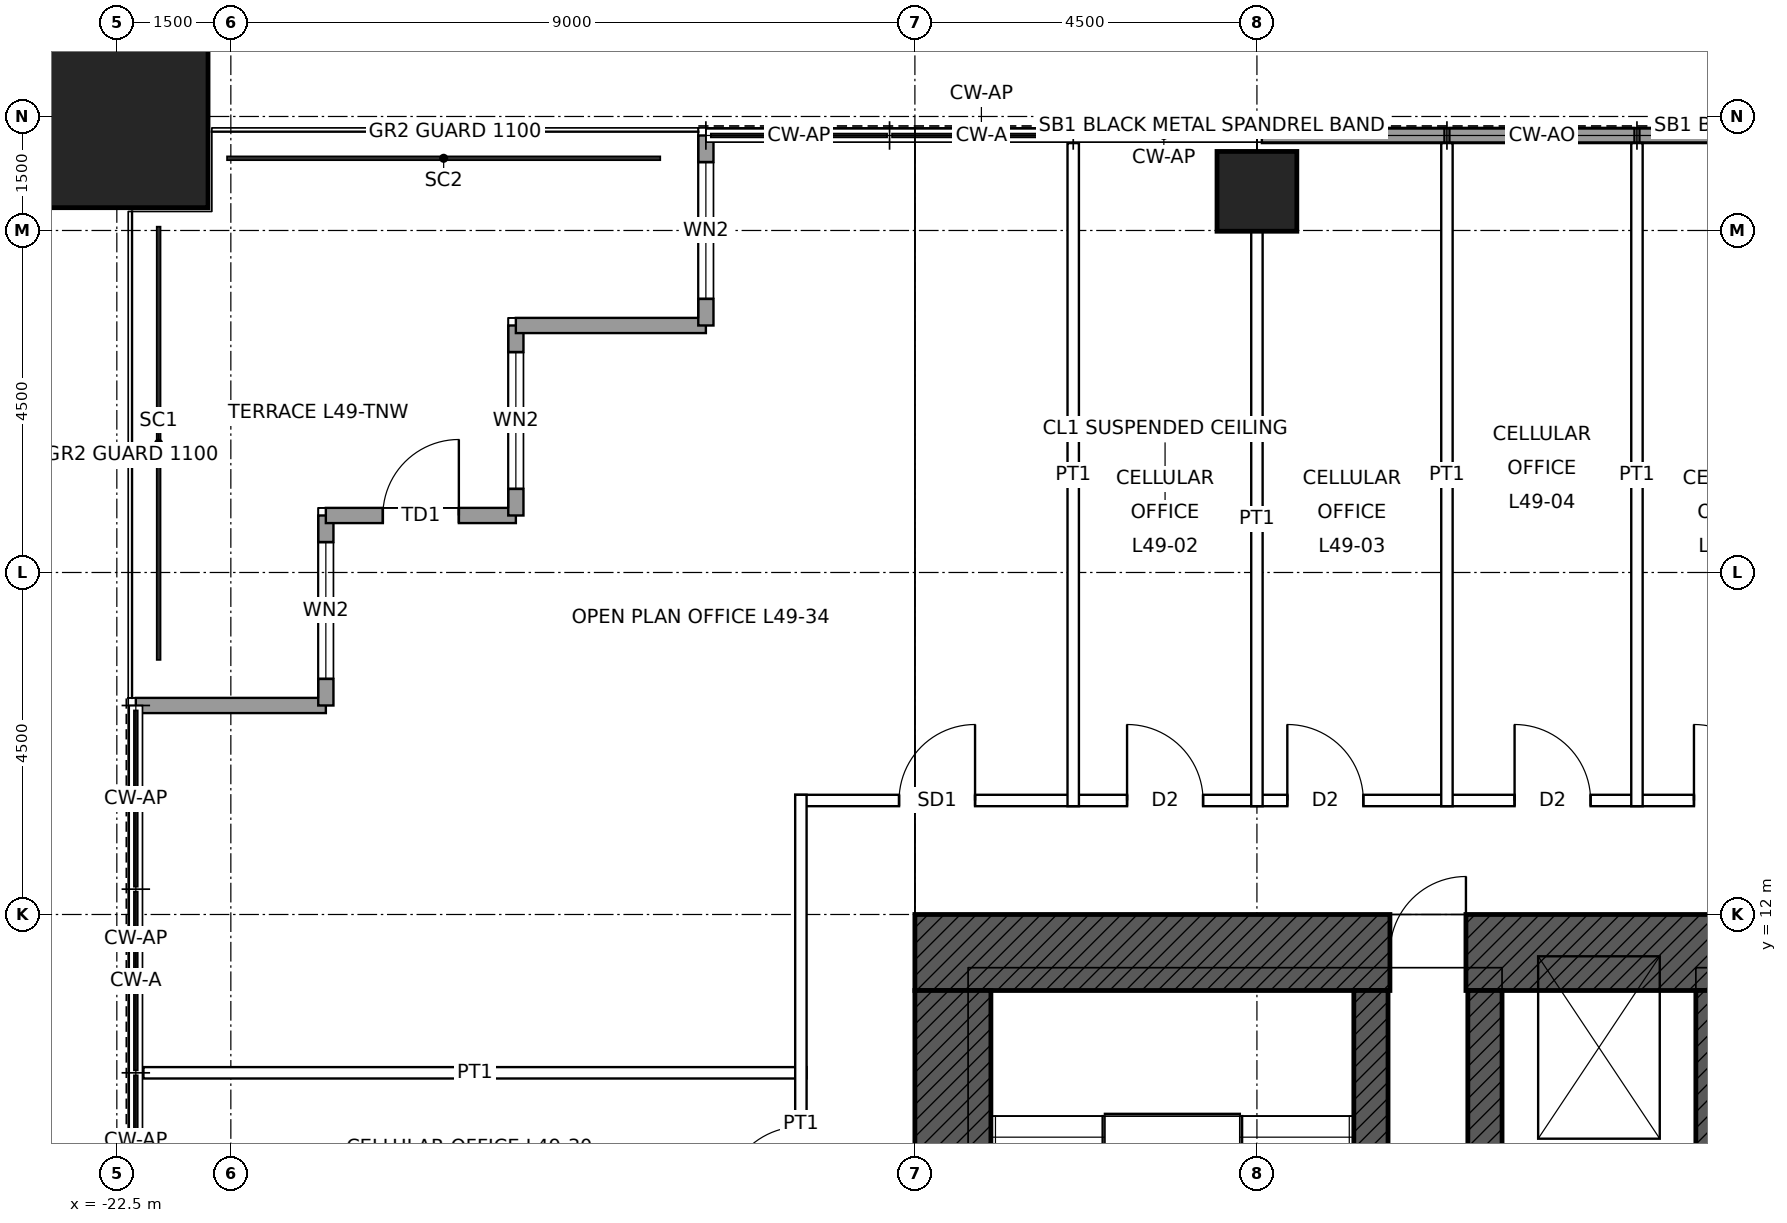
"""IFC4 building model, lengths in metres.
Left out: names, types, materials, properties, quantities, classifications, styles, units other than length and angle.
Written with IfcOpenShell. Run it as: python <this file> out.ifc"""

import sys

from ifc_helpers import new_model, si_unit, direction, frame, frame_2d, origin, origin_2d, place, context, subcontext, project, spatial, rectangle, hollow_rectangle, extrude, element, fill, save


model = new_model("IFC4")
c1 = context("Model", 3, precision=1e-05, world=origin(), true_north=direction((0.0, 1.0)))
c2 = subcontext(c1, "Body", "Model", "MODEL_VIEW")
j1 = project(units=[si_unit("LENGTHUNIT", "METRE"), si_unit("PLANEANGLEUNIT", "RADIAN")], contexts=[c1])
p1 = place(None, origin())
s1 = spatial("IfcSite", under=j1, at=p1, CompositionType="ELEMENT")
p2 = place(p1, origin())
s2 = spatial("IfcBuilding", under=s1, at=p2, CompositionType="ELEMENT")
p3 = place(p2, frame((0.0, 0.0, 229.9)))
s3 = spatial("IfcBuildingStorey", under=s2, at=p3, CompositionType="ELEMENT", Elevation=229.9)
p4 = place(p3, frame((-22.5, 22.5, 0.0), z_axis=(0.0, 0.0, 1.0), x_axis=(1.0, 0.0, 0.0)))
e1 = element("IfcColumn", 1, at=p4, inside=s3, PredefinedType="COLUMN", context=c2, shape_type="SweptSolid", body=[
    extrude(hollow_rectangle(XDim=2.4, YDim=2.4, WallThickness=0.12, at=origin_2d()), origin(), (0.0, 0.0, 1.0), 4.0),
])
p5 = place(p3, frame((-7.5, 21.515, 0.0), z_axis=(0.0, 0.0, 1.0), x_axis=(1.0, 0.0, 0.0)))
e2 = element("IfcColumn", 2, at=p5, inside=s3, PredefinedType="COLUMN", context=c2, shape_type="SweptSolid", body=[
    extrude(hollow_rectangle(XDim=1.05, YDim=1.05, WallThickness=0.07, at=origin_2d()), origin(), (0.0, 0.0, 1.0), 4.0),
])
p6 = place(p3, frame((-12.0, 11.5, 0.0), z_axis=(0.0, 0.0, 1.0), x_axis=(1.0, 0.0, 0.0)))
e3 = element("IfcWall", 3, at=p6, inside=s3, PredefinedType="SHEAR", context=c2, shape_type="SweptSolid", body=[
    extrude(rectangle(XDim=24.0, YDim=1.0, at=frame_2d((12.0, 0.0))), origin(), (0.0, 0.0, 1.0), 4.0),
])
p7 = place(p6, frame((6.25, 0.0, 0.0)))
e4 = element("IfcOpeningElement", 4, at=p7, cuts=e3, PredefinedType="OPENING", context=c2, shape_type="SweptSolid", body=[
    extrude(rectangle(XDim=1.0, YDim=2.4, at=frame_2d((0.5, 1.2))), frame((0.0, 0.51, 0.0), z_axis=(0.0, -1.0, 0.0), x_axis=(1.0, 0.0, 0.0)), (0.0, 0.0, 1.0), 1.02),
])
p8 = place(p6, frame((16.75, 0.0, 0.0)))
e5 = element("IfcOpeningElement", 5, at=p8, cuts=e3, PredefinedType="OPENING", context=c2, shape_type="SweptSolid", body=[
    extrude(rectangle(XDim=1.0, YDim=2.4, at=frame_2d((0.5, 1.2))), frame((0.0, 0.51, 0.0), z_axis=(0.0, -1.0, 0.0), x_axis=(1.0, 0.0, 0.0)), (0.0, 0.0, 1.0), 1.02),
])
p9 = place(p3, frame((-11.5, -11.0, 0.0), z_axis=(0.0, 0.0, 1.0), x_axis=(0.0, 1.0, 0.0)))
e6 = element("IfcWall", 6, at=p9, inside=s3, PredefinedType="SHEAR", context=c2, shape_type="SweptSolid", body=[
    extrude(rectangle(XDim=22.0, YDim=1.0, at=frame_2d((11.0, 0.0))), origin(), (0.0, 0.0, 1.0), 4.0),
])
p10 = place(p9, frame((10.5, 0.0, 0.0)))
e7 = element("IfcOpeningElement", 7, at=p10, cuts=e6, PredefinedType="OPENING", context=c2, shape_type="SweptSolid", body=[
    extrude(rectangle(XDim=1.0, YDim=2.4, at=frame_2d((0.5, 1.2))), frame((0.0, 0.51, 0.0), z_axis=(0.0, -1.0, 0.0), x_axis=(1.0, 0.0, 0.0)), (0.0, 0.0, 1.0), 1.02),
])
p11 = place(p3, frame((-6.0, 4.5, 0.0), z_axis=(0.0, 0.0, 1.0), x_axis=(0.0, 1.0, 0.0)))
e8 = element("IfcWall", 8, at=p11, inside=s3, PredefinedType="SHEAR", context=c2, shape_type="SweptSolid", body=[
    extrude(rectangle(XDim=6.5, YDim=0.45, at=frame_2d((3.25, 0.0))), origin(), (0.0, 0.0, 1.0), 4.0),
])
p12 = place(p11, frame((0.6, 0.0, 0.0)))
e9 = element("IfcOpeningElement", 9, at=p12, cuts=e8, PredefinedType="OPENING", context=c2, shape_type="SweptSolid", body=[
    extrude(rectangle(XDim=1.0, YDim=2.1, at=frame_2d((0.5, 1.05))), frame((0.0, 0.235, 0.0), z_axis=(0.0, -1.0, 0.0), x_axis=(1.0, 0.0, 0.0)), (0.0, 0.0, 1.0), 0.47),
])
for number, where, z_axis, x_axis in (
    (10, (-4.5, 8.5, 0.0), (0.0, 0.0, 1.0), (0.0, 1.0, 0.0)),
    (11, (-1.5, 8.5, 0.0), (0.0, 0.0, 1.0), (0.0, 1.0, 0.0)),
):
    element("IfcWall", number, at=place(p3, frame(where, z_axis=z_axis, x_axis=x_axis)), inside=s3, PredefinedType="SHEAR", context=c2, shape_type="SweptSolid", body=[
        extrude(rectangle(XDim=2.5, YDim=0.45, at=frame_2d((1.25, 0.0))), origin(), (0.0, 0.0, 1.0), 4.0),
    ])
p13 = place(p3, frame((-22.25, 14.75, 0.0), z_axis=(0.0, 0.0, 1.0), x_axis=(1.0, 0.0, 0.0)))
e12 = element("IfcWall", 12, at=p13, inside=s3, PredefinedType="SOLIDWALL", context=c2, shape_type="SweptSolid", body=[
    extrude(rectangle(XDim=2.5, YDim=0.2, at=frame_2d((1.25, 0.0))), origin(), (0.0, 0.0, 1.0), 3.85),
])
p14 = place(p3, frame((-19.75, 14.75, 0.0), z_axis=(0.0, 0.0, 1.0), x_axis=(0.0, 1.0, 0.0)))
e13 = element("IfcWall", 13, at=p14, inside=s3, PredefinedType="SOLIDWALL", context=c2, shape_type="SweptSolid", body=[
    extrude(rectangle(XDim=2.5, YDim=0.2, at=frame_2d((1.25, 0.0))), origin(), (0.0, 0.0, 1.0), 3.85),
])
p15 = place(p14, frame((0.35, 0.0, 0.3)))
e14 = element("IfcOpeningElement", 14, at=p15, cuts=e13, PredefinedType="OPENING", context=c2, shape_type="SweptSolid", body=[
    extrude(rectangle(XDim=1.8, YDim=2.4, at=frame_2d((0.9, 1.2))), frame((0.0, 0.11, 0.0), z_axis=(0.0, -1.0, 0.0), x_axis=(1.0, 0.0, 0.0)), (0.0, 0.0, 1.0), 0.22),
])
p16 = place(p3, frame((-19.75, 17.25, 0.0), z_axis=(0.0, 0.0, 1.0), x_axis=(1.0, 0.0, 0.0)))
e15 = element("IfcWall", 15, at=p16, inside=s3, PredefinedType="SOLIDWALL", context=c2, shape_type="SweptSolid", body=[
    extrude(rectangle(XDim=2.5, YDim=0.2, at=frame_2d((1.25, 0.0))), origin(), (0.0, 0.0, 1.0), 3.85),
])
p17 = place(p16, frame((0.75, 0.0, 0.0)))
e16 = element("IfcOpeningElement", 16, at=p17, cuts=e15, PredefinedType="OPENING", context=c2, shape_type="SweptSolid", body=[
    extrude(rectangle(XDim=1.0, YDim=2.4, at=frame_2d((0.5, 1.2))), frame((0.0, 0.11, 0.0), z_axis=(0.0, -1.0, 0.0), x_axis=(1.0, 0.0, 0.0)), (0.0, 0.0, 1.0), 0.22),
])
p18 = place(p3, frame((-17.25, 17.25, 0.0), z_axis=(0.0, 0.0, 1.0), x_axis=(0.0, 1.0, 0.0)))
e17 = element("IfcWall", 17, at=p18, inside=s3, PredefinedType="SOLIDWALL", context=c2, shape_type="SweptSolid", body=[
    extrude(rectangle(XDim=2.5, YDim=0.2, at=frame_2d((1.25, 0.0))), origin(), (0.0, 0.0, 1.0), 3.85),
])
p19 = place(p18, frame((0.35, 0.0, 0.3)))
e18 = element("IfcOpeningElement", 18, at=p19, cuts=e17, PredefinedType="OPENING", context=c2, shape_type="SweptSolid", body=[
    extrude(rectangle(XDim=1.8, YDim=2.4, at=frame_2d((0.9, 1.2))), frame((0.0, 0.11, 0.0), z_axis=(0.0, -1.0, 0.0), x_axis=(1.0, 0.0, 0.0)), (0.0, 0.0, 1.0), 0.22),
])
p20 = place(p3, frame((-17.25, 19.75, 0.0), z_axis=(0.0, 0.0, 1.0), x_axis=(1.0, 0.0, 0.0)))
e19 = element("IfcWall", 19, at=p20, inside=s3, PredefinedType="SOLIDWALL", context=c2, shape_type="SweptSolid", body=[
    extrude(rectangle(XDim=2.5, YDim=0.2, at=frame_2d((1.25, 0.0))), origin(), (0.0, 0.0, 1.0), 3.85),
])
p21 = place(p3, frame((-14.75, 19.75, 0.0), z_axis=(0.0, 0.0, 1.0), x_axis=(0.0, 1.0, 0.0)))
e20 = element("IfcWall", 20, at=p21, inside=s3, PredefinedType="SOLIDWALL", context=c2, shape_type="SweptSolid", body=[
    extrude(rectangle(XDim=2.5, YDim=0.2, at=frame_2d((1.25, 0.0))), origin(), (0.0, 0.0, 1.0), 3.85),
])
p22 = place(p21, frame((0.35, 0.0, 0.3)))
e21 = element("IfcOpeningElement", 21, at=p22, cuts=e20, PredefinedType="OPENING", context=c2, shape_type="SweptSolid", body=[
    extrude(rectangle(XDim=1.8, YDim=2.4, at=frame_2d((0.9, 1.2))), frame((0.0, 0.11, 0.0), z_axis=(0.0, -1.0, 0.0), x_axis=(1.0, 0.0, 0.0)), (0.0, 0.0, 1.0), 0.22),
])
p23 = place(p3, frame((-7.435, 22.25, 0.0), z_axis=(0.0, 0.0, 1.0), x_axis=(1.0, 0.0, 0.0)))
e22 = element("IfcWall", 22, at=p23, inside=s3, PredefinedType="SOLIDWALL", context=c2, shape_type="SweptSolid", body=[
    extrude(rectangle(XDim=2.403, YDim=0.2, at=frame_2d((1.201, 0.0))), origin(), (0.0, 0.0, 1.0), 3.85),
])
p24 = place(p3, frame((-4.968, 22.25, 0.0), z_axis=(0.0, 0.0, 1.0), x_axis=(1.0, 0.0, 0.0)))
e23 = element("IfcWall", 23, at=p24, inside=s3, PredefinedType="SOLIDWALL", context=c2, shape_type="SweptSolid", body=[
    extrude(rectangle(XDim=2.435, YDim=0.2, at=frame_2d((1.218, 0.0))), origin(), (0.0, 0.0, 1.0), 3.85),
])
p25 = place(p3, frame((-2.468, 22.25, 0.0), z_axis=(0.0, 0.0, 1.0), x_axis=(1.0, 0.0, 0.0)))
e24 = element("IfcWall", 24, at=p25, inside=s3, PredefinedType="SOLIDWALL", context=c2, shape_type="SweptSolid", body=[
    extrude(rectangle(XDim=2.403, YDim=0.2, at=frame_2d((1.201, 0.0))), origin(), (0.0, 0.0, 1.0), 3.85),
])
p26 = place(p3, frame((-22.15, 9.917, 0.0), z_axis=(0.0, 0.0, 1.0), x_axis=(1.0, 0.0, 0.0)))
e25 = element("IfcWall", 25, at=p26, inside=s3, PredefinedType="PARTITIONING", context=c2, shape_type="SweptSolid", body=[
    extrude(rectangle(XDim=8.725, YDim=0.15, at=frame_2d((4.362, 0.0))), origin(), (0.0, 0.0, 1.0), 3.85),
])
p27 = place(p3, frame((-13.575, 13.5, 0.0), z_axis=(0.0, 0.0, 1.0), x_axis=(1.0, 0.0, 0.0)))
e26 = element("IfcWall", 26, at=p27, inside=s3, PredefinedType="PARTITIONING", context=c2, shape_type="SweptSolid", body=[
    extrude(rectangle(XDim=27.15, YDim=0.15, at=frame_2d((13.575, 0.0))), origin(), (0.0, 0.0, 1.0), 3.85),
])
p28 = place(p27, frame((4.366, 0.0, 0.0)))
e27 = element("IfcOpeningElement", 27, at=p28, cuts=e26, PredefinedType="OPENING", context=c2, shape_type="SweptSolid", body=[
    extrude(rectangle(XDim=1.0, YDim=2.1, at=frame_2d((0.5, 1.05))), frame((0.0, 0.085, 0.0), z_axis=(0.0, -1.0, 0.0), x_axis=(1.0, 0.0, 0.0)), (0.0, 0.0, 1.0), 0.17),
])
p29 = place(p27, frame((6.475, 0.0, 0.0)))
e28 = element("IfcOpeningElement", 28, at=p29, cuts=e26, PredefinedType="OPENING", context=c2, shape_type="SweptSolid", body=[
    extrude(rectangle(XDim=1.0, YDim=2.1, at=frame_2d((0.5, 1.05))), frame((0.0, 0.085, 0.0), z_axis=(0.0, -1.0, 0.0), x_axis=(1.0, 0.0, 0.0)), (0.0, 0.0, 1.0), 0.17),
])
p30 = place(p27, frame((9.465, 0.0, 0.0)))
e29 = element("IfcOpeningElement", 29, at=p30, cuts=e26, PredefinedType="OPENING", context=c2, shape_type="SweptSolid", body=[
    extrude(rectangle(XDim=1.0, YDim=2.1, at=frame_2d((0.5, 1.05))), frame((0.0, 0.085, 0.0), z_axis=(0.0, -1.0, 0.0), x_axis=(1.0, 0.0, 0.0)), (0.0, 0.0, 1.0), 0.17),
])
p31 = place(p27, frame((11.825, 0.0, 0.0)))
e30 = element("IfcOpeningElement", 30, at=p31, cuts=e26, PredefinedType="OPENING", context=c2, shape_type="SweptSolid", body=[
    extrude(rectangle(XDim=1.0, YDim=2.1, at=frame_2d((0.5, 1.05))), frame((0.0, 0.085, 0.0), z_axis=(0.0, -1.0, 0.0), x_axis=(1.0, 0.0, 0.0)), (0.0, 0.0, 1.0), 0.17),
])
p32 = place(p27, frame((14.325, 0.0, 0.0)))
e31 = element("IfcOpeningElement", 31, at=p32, cuts=e26, PredefinedType="OPENING", context=c2, shape_type="SweptSolid", body=[
    extrude(rectangle(XDim=1.0, YDim=2.1, at=frame_2d((0.5, 1.05))), frame((0.0, 0.085, 0.0), z_axis=(0.0, -1.0, 0.0), x_axis=(1.0, 0.0, 0.0)), (0.0, 0.0, 1.0), 0.17),
])
p33 = place(p27, frame((16.475, 0.0, 0.0)))
e32 = element("IfcOpeningElement", 32, at=p33, cuts=e26, PredefinedType="OPENING", context=c2, shape_type="SweptSolid", body=[
    extrude(rectangle(XDim=1.0, YDim=2.1, at=frame_2d((0.5, 1.05))), frame((0.0, 0.085, 0.0), z_axis=(0.0, -1.0, 0.0), x_axis=(1.0, 0.0, 0.0)), (0.0, 0.0, 1.0), 0.17),
])
p34 = place(p27, frame((19.675, 0.0, 0.0)))
e33 = element("IfcOpeningElement", 33, at=p34, cuts=e26, PredefinedType="OPENING", context=c2, shape_type="SweptSolid", body=[
    extrude(rectangle(XDim=1.0, YDim=2.1, at=frame_2d((0.5, 1.05))), frame((0.0, 0.085, 0.0), z_axis=(0.0, -1.0, 0.0), x_axis=(1.0, 0.0, 0.0)), (0.0, 0.0, 1.0), 0.17),
])
p35 = place(p27, frame((21.783, 0.0, 0.0)))
e34 = element("IfcOpeningElement", 34, at=p35, cuts=e26, PredefinedType="OPENING", context=c2, shape_type="SweptSolid", body=[
    extrude(rectangle(XDim=1.0, YDim=2.1, at=frame_2d((0.5, 1.05))), frame((0.0, 0.085, 0.0), z_axis=(0.0, -1.0, 0.0), x_axis=(1.0, 0.0, 0.0)), (0.0, 0.0, 1.0), 0.17),
])
p36 = place(p27, frame((24.783, 0.0, 0.0)))
e35 = element("IfcOpeningElement", 35, at=p36, cuts=e26, PredefinedType="OPENING", context=c2, shape_type="SweptSolid", body=[
    extrude(rectangle(XDim=1.0, YDim=2.4, at=frame_2d((0.5, 1.2))), frame((0.0, 0.085, 0.0), z_axis=(0.0, -1.0, 0.0), x_axis=(1.0, 0.0, 0.0)), (0.0, 0.0, 1.0), 0.17),
])
p37 = place(p27, frame((1.366, 0.0, 0.0)))
e36 = element("IfcOpeningElement", 36, at=p37, cuts=e26, PredefinedType="OPENING", context=c2, shape_type="SweptSolid", body=[
    extrude(rectangle(XDim=1.0, YDim=2.4, at=frame_2d((0.5, 1.2))), frame((0.0, 0.085, 0.0), z_axis=(0.0, -1.0, 0.0), x_axis=(1.0, 0.0, 0.0)), (0.0, 0.0, 1.0), 0.17),
])
p38 = place(p3, frame((-13.5, 4.925, 0.0), z_axis=(0.0, 0.0, 1.0), x_axis=(0.0, 1.0, 0.0)))
e37 = element("IfcWall", 37, at=p38, inside=s3, PredefinedType="PARTITIONING", context=c2, shape_type="SweptSolid", body=[
    extrude(rectangle(XDim=8.65, YDim=0.15, at=frame_2d((4.325, 0.0))), origin(), (0.0, 0.0, 1.0), 3.85),
])
p39 = place(p38, frame((0.825, 0.0, 0.0)))
e38 = element("IfcOpeningElement", 38, at=p39, cuts=e37, PredefinedType="OPENING", context=c2, shape_type="SweptSolid", body=[
    extrude(rectangle(XDim=1.0, YDim=2.1, at=frame_2d((0.5, 1.05))), frame((0.0, 0.085, 0.0), z_axis=(0.0, -1.0, 0.0), x_axis=(1.0, 0.0, 0.0)), (0.0, 0.0, 1.0), 0.17),
])
p40 = place(p38, frame((3.283, 0.0, 0.0)))
e39 = element("IfcOpeningElement", 39, at=p40, cuts=e37, PredefinedType="OPENING", context=c2, shape_type="SweptSolid", body=[
    extrude(rectangle(XDim=1.0, YDim=2.1, at=frame_2d((0.5, 1.05))), frame((0.0, 0.085, 0.0), z_axis=(0.0, -1.0, 0.0), x_axis=(1.0, 0.0, 0.0)), (0.0, 0.0, 1.0), 0.17),
])
p41 = place(p3, frame((-9.917, 13.425, 0.0), z_axis=(0.0, 0.0, 1.0), x_axis=(0.0, 1.0, 0.0)))
e40 = element("IfcWall", 40, at=p41, inside=s3, PredefinedType="PARTITIONING", context=c2, shape_type="SweptSolid", body=[
    extrude(rectangle(XDim=8.725, YDim=0.15, at=frame_2d((4.362, 0.0))), origin(), (0.0, 0.0, 1.0), 3.85),
])
p42 = place(p3, frame((-7.5, 13.425, 0.0), z_axis=(0.0, 0.0, 1.0), x_axis=(0.0, 1.0, 0.0)))
e41 = element("IfcWall", 41, at=p42, inside=s3, PredefinedType="PARTITIONING", context=c2, shape_type="SweptSolid", body=[
    extrude(rectangle(XDim=7.565, YDim=0.15, at=frame_2d((3.782, 0.0))), origin(), (0.0, 0.0, 1.0), 3.238),
])
for number, where, z_axis, x_axis in (
    (42, (-5.0, 13.425, 0.0), (0.0, 0.0, 1.0), (0.0, 1.0, 0.0)),
    (43, (-2.5, 13.425, 0.0), (0.0, 0.0, 1.0), (0.0, 1.0, 0.0)),
):
    element("IfcWall", number, at=place(p3, frame(where, z_axis=z_axis, x_axis=x_axis)), inside=s3, PredefinedType="PARTITIONING", context=c2, shape_type="SweptSolid", body=[
        extrude(rectangle(XDim=8.725, YDim=0.15, at=frame_2d((4.362, 0.0))), origin(), (0.0, 0.0, 1.0), 3.85),
    ])
p43 = place(p15, origin())
e44 = element("IfcWindow", 44, at=p43, inside=s3, PartitioningType="SINGLE_PANEL", PredefinedType="WINDOW", context=c2, shape_type="SweptSolid", body=[
    extrude(rectangle(XDim=1.8, YDim=2.4, at=frame_2d((0.9, 1.2))), frame((0.0, 0.03, 0.0), z_axis=(0.0, -1.0, 0.0), x_axis=(1.0, 0.0, 0.0)), (0.0, 0.0, 1.0), 0.06),
])
fill(e14, e44)
p44 = place(p17, origin())
e45 = element("IfcDoor", 45, at=p44, inside=s3, OperationType="SINGLE_SWING_RIGHT", PredefinedType="DOOR", context=c2, shape_type="SweptSolid", body=[
    extrude(rectangle(XDim=1.0, YDim=2.4, at=frame_2d((0.5, 1.2))), frame((0.0, 0.025, 0.0), z_axis=(0.0, -1.0, 0.0), x_axis=(1.0, 0.0, 0.0)), (0.0, 0.0, 1.0), 0.05),
])
fill(e16, e45)
p45 = place(p19, origin())
e46 = element("IfcWindow", 46, at=p45, inside=s3, PartitioningType="SINGLE_PANEL", PredefinedType="WINDOW", context=c2, shape_type="SweptSolid", body=[
    extrude(rectangle(XDim=1.8, YDim=2.4, at=frame_2d((0.9, 1.2))), frame((0.0, 0.03, 0.0), z_axis=(0.0, -1.0, 0.0), x_axis=(1.0, 0.0, 0.0)), (0.0, 0.0, 1.0), 0.06),
])
fill(e18, e46)
p46 = place(p22, origin())
e47 = element("IfcWindow", 47, at=p46, inside=s3, PartitioningType="SINGLE_PANEL", PredefinedType="WINDOW", context=c2, shape_type="SweptSolid", body=[
    extrude(rectangle(XDim=1.8, YDim=2.4, at=frame_2d((0.9, 1.2))), frame((0.0, 0.03, 0.0), z_axis=(0.0, -1.0, 0.0), x_axis=(1.0, 0.0, 0.0)), (0.0, 0.0, 1.0), 0.06),
])
fill(e21, e47)
p47 = place(p7, origin())
e48 = element("IfcDoor", 48, at=p47, inside=s3, OperationType="SINGLE_SWING_RIGHT", PredefinedType="DOOR", context=c2, shape_type="SweptSolid", body=[
    extrude(rectangle(XDim=1.0, YDim=2.4, at=frame_2d((0.5, 1.2))), frame((0.0, 0.485, 0.0), z_axis=(0.0, -1.0, 0.0), x_axis=(1.0, 0.0, 0.0)), (0.0, 0.0, 1.0), 0.05),
])
fill(e4, e48)
p48 = place(p28, origin())
e49 = element("IfcDoor", 49, at=p48, inside=s3, OperationType="SINGLE_SWING_LEFT", PredefinedType="DOOR", context=c2, shape_type="SweptSolid", body=[
    extrude(rectangle(XDim=1.0, YDim=2.1, at=frame_2d((0.5, 1.05))), frame((0.0, 0.025, 0.0), z_axis=(0.0, -1.0, 0.0), x_axis=(1.0, 0.0, 0.0)), (0.0, 0.0, 1.0), 0.05),
])
fill(e27, e49)
p49 = place(p29, origin())
e50 = element("IfcDoor", 50, at=p49, inside=s3, OperationType="SINGLE_SWING_LEFT", PredefinedType="DOOR", context=c2, shape_type="SweptSolid", body=[
    extrude(rectangle(XDim=1.0, YDim=2.1, at=frame_2d((0.5, 1.05))), frame((0.0, 0.025, 0.0), z_axis=(0.0, -1.0, 0.0), x_axis=(1.0, 0.0, 0.0)), (0.0, 0.0, 1.0), 0.05),
])
fill(e28, e50)
p50 = place(p30, origin())
e51 = element("IfcDoor", 51, at=p50, inside=s3, OperationType="SINGLE_SWING_LEFT", PredefinedType="DOOR", context=c2, shape_type="SweptSolid", body=[
    extrude(rectangle(XDim=1.0, YDim=2.1, at=frame_2d((0.5, 1.05))), frame((0.0, 0.025, 0.0), z_axis=(0.0, -1.0, 0.0), x_axis=(1.0, 0.0, 0.0)), (0.0, 0.0, 1.0), 0.05),
])
fill(e29, e51)
p51 = place(p31, origin())
e52 = element("IfcDoor", 52, at=p51, inside=s3, OperationType="SINGLE_SWING_LEFT", PredefinedType="DOOR", context=c2, shape_type="SweptSolid", body=[
    extrude(rectangle(XDim=1.0, YDim=2.1, at=frame_2d((0.5, 1.05))), frame((0.0, 0.025, 0.0), z_axis=(0.0, -1.0, 0.0), x_axis=(1.0, 0.0, 0.0)), (0.0, 0.0, 1.0), 0.05),
])
fill(e30, e52)
p52 = place(p40, origin())
e53 = element("IfcDoor", 53, at=p52, inside=s3, OperationType="SINGLE_SWING_LEFT", PredefinedType="DOOR", context=c2, shape_type="SweptSolid", body=[
    extrude(rectangle(XDim=1.0, YDim=2.1, at=frame_2d((0.5, 1.05))), frame((0.0, 0.025, 0.0), z_axis=(0.0, -1.0, 0.0), x_axis=(1.0, 0.0, 0.0)), (0.0, 0.0, 1.0), 0.05),
])
fill(e39, e53)
p53 = place(p37, origin())
e54 = element("IfcDoor", 54, at=p53, inside=s3, OperationType="SINGLE_SWING_RIGHT", PredefinedType="DOOR", context=c2, shape_type="SweptSolid", body=[
    extrude(rectangle(XDim=1.0, YDim=2.4, at=frame_2d((0.5, 1.2))), frame((0.0, 0.025, 0.0), z_axis=(0.0, -1.0, 0.0), x_axis=(1.0, 0.0, 0.0)), (0.0, 0.0, 1.0), 0.05),
])
fill(e36, e54)
save(model, sys.argv[1])
